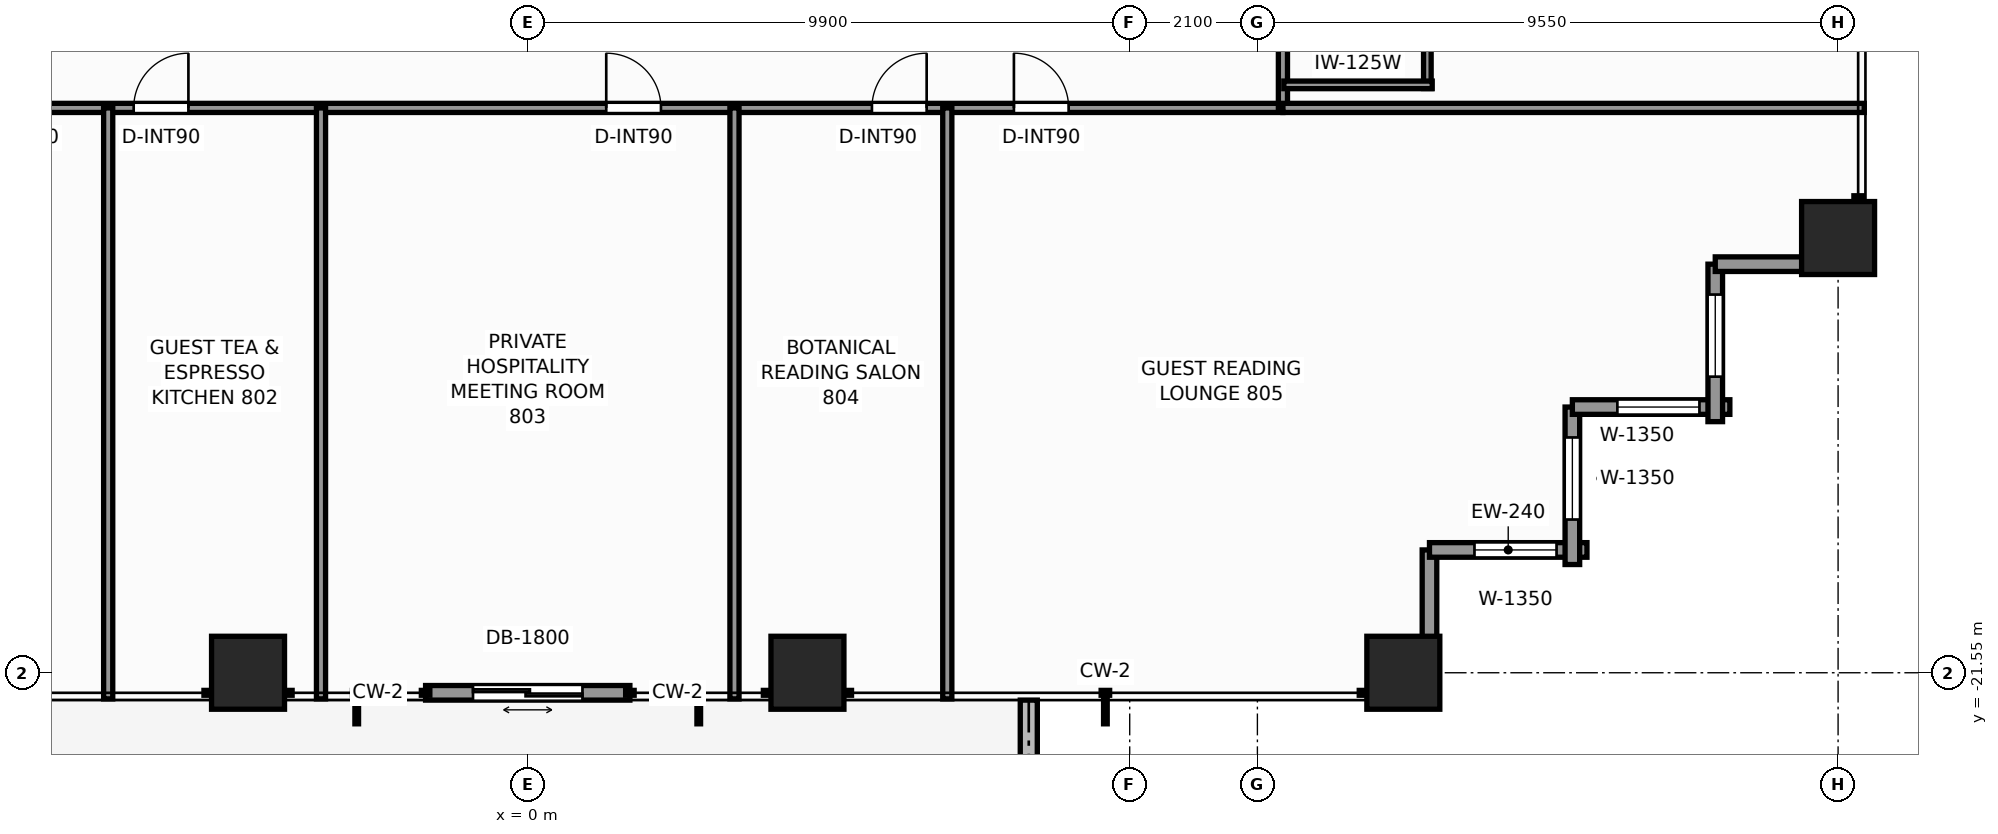
"""IFC4 building model, lengths in metres.
Left out: names, types, materials, properties, quantities, classifications, styles, units other than length and angle.
Written with IfcOpenShell. Run it as: python <this file> out.ifc"""

import sys

from ifc_helpers import new_model, si_unit, direction, frame, frame_2d, origin, origin_2d, place, context, subcontext, project, spatial, rectangle, extrude, element, fill, save


model = new_model("IFC4")
c1 = context("Model", 3, precision=1e-05, world=origin(), true_north=direction((0.0, 1.0)))
c2 = subcontext(c1, "Body", "Model", "MODEL_VIEW")
j1 = project(units=[si_unit("LENGTHUNIT", "METRE"), si_unit("PLANEANGLEUNIT", "RADIAN")], contexts=[c1])
p1 = place(None, origin())
s1 = spatial("IfcSite", under=j1, at=p1, CompositionType="ELEMENT")
p2 = place(p1, origin())
s2 = spatial("IfcBuilding", under=s1, at=p2, CompositionType="ELEMENT")
p3 = place(p2, frame((0.0, 0.0, 30.4)))
s3 = spatial("IfcBuildingStorey", under=s2, at=p3, CompositionType="ELEMENT", Elevation=30.4)
for number, where, z_axis, x_axis in (
    (1, (-4.6, -21.55, 0.0), (0.0, 0.0, 1.0), (1.0, 0.0, 0.0)),
    (2, (4.6, -21.55, 0.0), (0.0, 0.0, 1.0), (1.0, 0.0, 0.0)),
    (3, (14.4, -21.55, 0.0), (0.0, 0.0, 1.0), (1.0, 0.0, 0.0)),
    (4, (21.55, -14.4, 0.0), (0.0, 0.0, 1.0), (1.0, 0.0, 0.0)),
):
    element("IfcColumn", number, at=place(p3, frame(where, z_axis=z_axis, x_axis=x_axis)), inside=s3, PredefinedType="COLUMN", context=c2, shape_type="SweptSolid", body=[
        extrude(rectangle(XDim=1.2, YDim=1.2, at=origin_2d()), origin(), (0.0, 0.0, 1.0), 3.3),
    ])
p4 = place(p3, frame((8.24, -25.42, -0.06), z_axis=(0.0, 0.0, 1.0), x_axis=(0.0, 1.0, 0.0)))
e5 = element("IfcWall", 5, at=p4, inside=s3, PredefinedType="PARAPET", context=c2, shape_type="SweptSolid", body=[
    extrude(rectangle(XDim=3.42, YDim=0.28, at=frame_2d((1.71, 0.0))), origin(), (0.0, 0.0, 1.0), 0.42),
])
p5 = place(p3, frame((1.68, -21.88, 0.0), z_axis=(0.0, 0.0, 1.0), x_axis=(-1.0, 0.0, 0.0)))
e6 = element("IfcWall", 6, at=p5, inside=s3, PredefinedType="STANDARD", context=c2, shape_type="SweptSolid", body=[
    extrude(rectangle(XDim=3.36, YDim=0.24, at=frame_2d((1.68, 0.0))), origin(), (0.0, 0.0, 1.0), 3.06),
])
p6 = place(p5, frame((0.78, 0.0, 0.0)))
e7 = element("IfcOpeningElement", 7, at=p6, cuts=e6, PredefinedType="OPENING", context=c2, shape_type="SweptSolid", body=[
    extrude(rectangle(XDim=1.8, YDim=2.2, at=frame_2d((0.9, 1.1))), frame((0.0, 0.13, 0.0), z_axis=(0.0, -1.0, 0.0), x_axis=(1.0, 0.0, 0.0)), (0.0, 0.0, 1.0), 0.26),
])
p7 = place(p3, frame((14.83, -19.53, 0.0), z_axis=(0.0, 0.0, 1.0), x_axis=(0.0, -1.0, 0.0)))
e8 = element("IfcWall", 8, at=p7, inside=s3, PredefinedType="STANDARD", context=c2, shape_type="SweptSolid", body=[
    extrude(rectangle(XDim=2.59, YDim=0.24, at=frame_2d((1.295, 0.0))), origin(), (0.0, 0.0, 1.0), 2.439),
])
p8 = place(p3, frame((17.42, -19.53, 0.0), z_axis=(0.0, 0.0, 1.0), x_axis=(-1.0, 0.0, 0.0)))
e9 = element("IfcWall", 9, at=p8, inside=s3, PredefinedType="STANDARD", context=c2, shape_type="SweptSolid", body=[
    extrude(rectangle(XDim=2.59, YDim=0.24, at=frame_2d((1.295, 0.0))), origin(), (0.0, 0.0, 1.0), 2.439),
])
p9 = place(p8, frame((0.5, 0.0, 0.65)))
e10 = element("IfcOpeningElement", 10, at=p9, cuts=e9, PredefinedType="OPENING", context=c2, shape_type="SweptSolid", body=[
    extrude(rectangle(XDim=1.35, YDim=1.55, at=frame_2d((0.675, 0.775))), frame((0.0, 0.13, 0.0), z_axis=(0.0, -1.0, 0.0), x_axis=(1.0, 0.0, 0.0)), (0.0, 0.0, 1.0), 0.26),
])
p10 = place(p3, frame((17.18, -17.18, 0.0), z_axis=(0.0, 0.0, 1.0), x_axis=(0.0, -1.0, 0.0)))
e11 = element("IfcWall", 11, at=p10, inside=s3, PredefinedType="STANDARD", context=c2, shape_type="SweptSolid", body=[
    extrude(rectangle(XDim=2.59, YDim=0.24, at=frame_2d((1.295, 0.0))), origin(), (0.0, 0.0, 1.0), 2.439),
])
p11 = place(p10, frame((0.5, 0.0, 0.65)))
e12 = element("IfcOpeningElement", 12, at=p11, cuts=e11, PredefinedType="OPENING", context=c2, shape_type="SweptSolid", body=[
    extrude(rectangle(XDim=1.35, YDim=1.55, at=frame_2d((0.675, 0.775))), frame((0.0, 0.13, 0.0), z_axis=(0.0, -1.0, 0.0), x_axis=(1.0, 0.0, 0.0)), (0.0, 0.0, 1.0), 0.26),
])
p12 = place(p3, frame((19.77, -17.18, 0.0), z_axis=(0.0, 0.0, 1.0), x_axis=(-1.0, 0.0, 0.0)))
e13 = element("IfcWall", 13, at=p12, inside=s3, PredefinedType="STANDARD", context=c2, shape_type="SweptSolid", body=[
    extrude(rectangle(XDim=2.59, YDim=0.24, at=frame_2d((1.295, 0.0))), origin(), (0.0, 0.0, 1.0), 2.439),
])
p13 = place(p12, frame((0.5, 0.0, 0.65)))
e14 = element("IfcOpeningElement", 14, at=p13, cuts=e13, PredefinedType="OPENING", context=c2, shape_type="SweptSolid", body=[
    extrude(rectangle(XDim=1.35, YDim=1.55, at=frame_2d((0.675, 0.775))), frame((0.0, 0.13, 0.0), z_axis=(0.0, -1.0, 0.0), x_axis=(1.0, 0.0, 0.0)), (0.0, 0.0, 1.0), 0.26),
])
p14 = place(p3, frame((19.53, -14.83, 0.0), z_axis=(0.0, 0.0, 1.0), x_axis=(0.0, -1.0, 0.0)))
e15 = element("IfcWall", 15, at=p14, inside=s3, PredefinedType="STANDARD", context=c2, shape_type="SweptSolid", body=[
    extrude(rectangle(XDim=2.59, YDim=0.24, at=frame_2d((1.295, 0.0))), origin(), (0.0, 0.0, 1.0), 2.439),
])
p15 = place(p14, frame((0.5, 0.0, 0.65)))
e16 = element("IfcOpeningElement", 16, at=p15, cuts=e15, PredefinedType="OPENING", context=c2, shape_type="SweptSolid", body=[
    extrude(rectangle(XDim=1.35, YDim=1.55, at=frame_2d((0.675, 0.775))), frame((0.0, 0.13, 0.0), z_axis=(0.0, -1.0, 0.0), x_axis=(1.0, 0.0, 0.0)), (0.0, 0.0, 1.0), 0.26),
])
p16 = place(p3, frame((22.12, -14.83, 0.0), z_axis=(0.0, 0.0, 1.0), x_axis=(-1.0, 0.0, 0.0)))
e17 = element("IfcWall", 17, at=p16, inside=s3, PredefinedType="STANDARD", context=c2, shape_type="SweptSolid", body=[
    extrude(rectangle(XDim=2.59, YDim=0.24, at=frame_2d((1.295, 0.0))), origin(), (0.0, 0.0, 1.0), 2.439),
])
p17 = place(p3, frame((-12.26, -12.26, 0.0), z_axis=(0.0, 0.0, 1.0), x_axis=(1.0, 0.0, 0.0)))
e18 = element("IfcWall", 18, at=p17, inside=s3, PredefinedType="PARTITIONING", context=c2, shape_type="SweptSolid", body=[
    extrude(rectangle(XDim=24.68, YDim=0.15, at=frame_2d((12.34, 0.0))), origin(), (0.0, 0.0, 1.0), 2.272),
])
p18 = place(p17, frame((3.444, 0.0, 0.0)))
e19 = element("IfcOpeningElement", 19, at=p18, cuts=e18, PredefinedType="OPENING", context=c2, shape_type="SweptSolid", body=[
    extrude(rectangle(XDim=0.9, YDim=2.06, at=frame_2d((0.45, 1.03))), frame((0.0, 0.085, 0.0), z_axis=(0.0, -1.0, 0.0), x_axis=(1.0, 0.0, 0.0)), (0.0, 0.0, 1.0), 0.17),
])
p19 = place(p17, frame((5.779, 0.0, 0.0)))
e20 = element("IfcOpeningElement", 20, at=p19, cuts=e18, PredefinedType="OPENING", context=c2, shape_type="SweptSolid", body=[
    extrude(rectangle(XDim=0.9, YDim=2.06, at=frame_2d((0.45, 1.03))), frame((0.0, 0.085, 0.0), z_axis=(0.0, -1.0, 0.0), x_axis=(1.0, 0.0, 0.0)), (0.0, 0.0, 1.0), 0.17),
])
p20 = place(p17, frame((13.551, 0.0, 0.0)))
e21 = element("IfcOpeningElement", 21, at=p20, cuts=e18, PredefinedType="OPENING", context=c2, shape_type="SweptSolid", body=[
    extrude(rectangle(XDim=0.9, YDim=2.06, at=frame_2d((0.45, 1.03))), frame((0.0, 0.085, 0.0), z_axis=(0.0, -1.0, 0.0), x_axis=(1.0, 0.0, 0.0)), (0.0, 0.0, 1.0), 0.17),
])
p21 = place(p17, frame((17.921, 0.0, 0.0)))
e22 = element("IfcOpeningElement", 22, at=p21, cuts=e18, PredefinedType="OPENING", context=c2, shape_type="SweptSolid", body=[
    extrude(rectangle(XDim=0.9, YDim=2.06, at=frame_2d((0.45, 1.03))), frame((0.0, 0.085, 0.0), z_axis=(0.0, -1.0, 0.0), x_axis=(1.0, 0.0, 0.0)), (0.0, 0.0, 1.0), 0.17),
])
p22 = place(p17, frame((20.256, 0.0, 0.0)))
e23 = element("IfcOpeningElement", 23, at=p22, cuts=e18, PredefinedType="OPENING", context=c2, shape_type="SweptSolid", body=[
    extrude(rectangle(XDim=0.9, YDim=2.06, at=frame_2d((0.45, 1.03))), frame((0.0, 0.085, 0.0), z_axis=(0.0, -1.0, 0.0), x_axis=(1.0, 0.0, 0.0)), (0.0, 0.0, 1.0), 0.17),
])
p23 = place(p3, frame((12.42, -12.26, 0.0), z_axis=(0.0, 0.0, 1.0), x_axis=(0.0, 1.0, 0.0)))
e24 = element("IfcWall", 24, at=p23, inside=s3, PredefinedType="PARTITIONING", context=c2, shape_type="SweptSolid", body=[
    extrude(rectangle(XDim=24.84, YDim=0.15, at=frame_2d((12.42, 0.0))), origin(), (0.0, 0.0, 1.0), 2.272),
])
p24 = place(p23, frame((4.099, 0.0, 0.0)))
e25 = element("IfcOpeningElement", 25, at=p24, cuts=e24, PredefinedType="OPENING", context=c2, shape_type="SweptSolid", body=[
    extrude(rectangle(XDim=0.95, YDim=2.06, at=frame_2d((0.475, 1.03))), frame((0.0, 0.085, 0.0), z_axis=(0.0, -1.0, 0.0), x_axis=(1.0, 0.0, 0.0)), (0.0, 0.0, 1.0), 0.17),
])
p25 = place(p23, frame((13.577, 0.0, 0.0)))
e26 = element("IfcOpeningElement", 26, at=p25, cuts=e24, PredefinedType="OPENING", context=c2, shape_type="SweptSolid", body=[
    extrude(rectangle(XDim=0.95, YDim=2.06, at=frame_2d((0.475, 1.03))), frame((0.0, 0.085, 0.0), z_axis=(0.0, -1.0, 0.0), x_axis=(1.0, 0.0, 0.0)), (0.0, 0.0, 1.0), 0.17),
])
p26 = place(p23, frame((19.692, 0.0, 0.0)))
e27 = element("IfcOpeningElement", 27, at=p26, cuts=e24, PredefinedType="OPENING", context=c2, shape_type="SweptSolid", body=[
    extrude(rectangle(XDim=0.95, YDim=2.06, at=frame_2d((0.475, 1.03))), frame((0.0, 0.085, 0.0), z_axis=(0.0, -1.0, 0.0), x_axis=(1.0, 0.0, 0.0)), (0.0, 0.0, 1.0), 0.17),
])
p27 = place(p3, frame((12.42, -12.26, 0.0), z_axis=(0.0, 0.0, 1.0), x_axis=(1.0, 0.0, 0.0)))
e28 = element("IfcWall", 28, at=p27, inside=s3, PredefinedType="PARTITIONING", context=c2, shape_type="SweptSolid", body=[
    extrude(rectangle(XDim=9.56, YDim=0.15, at=frame_2d((4.78, 0.0))), origin(), (0.0, 0.0, 1.0), 2.272),
])
for number, where, z_axis, x_axis in (
    (29, (-6.9, -21.98, 0.0), (0.0, 0.0, 1.0), (0.0, 1.0, 0.0)),
    (30, (-3.4, -21.98, 0.0), (0.0, 0.0, 1.0), (0.0, 1.0, 0.0)),
    (31, (3.4, -21.98, 0.0), (0.0, 0.0, 1.0), (0.0, 1.0, 0.0)),
    (32, (6.9, -21.98, 0.0), (0.0, 0.0, 1.0), (0.0, 1.0, 0.0)),
):
    element("IfcWall", number, at=place(p3, frame(where, z_axis=z_axis, x_axis=x_axis)), inside=s3, PredefinedType="PARTITIONING", context=c2, shape_type="SweptSolid", body=[
        extrude(rectangle(XDim=9.72, YDim=0.15, at=frame_2d((4.86, 0.0))), origin(), (0.0, 0.0, 1.0), 2.429),
    ])
p28 = place(p3, frame((14.795, -11.941, 0.0), z_axis=(0.0, 0.0, 1.0), x_axis=(0.0, 1.0, 0.0)))
e33 = element("IfcWall", 33, at=p28, inside=s3, PredefinedType="PARTITIONING", context=c2, shape_type="SweptSolid", body=[
    extrude(rectangle(XDim=2.27, YDim=0.125, at=frame_2d((1.135, 0.0))), origin(), (0.0, 0.0, 1.0), 2.272),
])
p29 = place(p3, frame((12.435, -11.881, 0.0), z_axis=(0.0, 0.0, 1.0), x_axis=(1.0, 0.0, 0.0)))
e34 = element("IfcWall", 34, at=p29, inside=s3, PredefinedType="PARTITIONING", context=c2, shape_type="SweptSolid", body=[
    extrude(rectangle(XDim=2.44, YDim=0.125, at=frame_2d((1.22, 0.0))), origin(), (0.0, 0.0, 1.0), 2.272),
])
p30 = place(p6, origin())
e35 = element("IfcDoor", 35, at=p30, inside=s3, OperationType="DOUBLE_DOOR_SLIDING", PredefinedType="DOOR", context=c2, shape_type="SweptSolid", body=[
    extrude(rectangle(XDim=1.8, YDim=2.2, at=frame_2d((0.9, 1.1))), frame((0.0, 0.025, 0.0), z_axis=(0.0, -1.0, 0.0), x_axis=(1.0, 0.0, 0.0)), (0.0, 0.0, 1.0), 0.05),
])
fill(e7, e35)
p31 = place(p9, origin())
e36 = element("IfcWindow", 36, at=p31, inside=s3, PartitioningType="SINGLE_PANEL", PredefinedType="WINDOW", context=c2, shape_type="SweptSolid", body=[
    extrude(rectangle(XDim=1.35, YDim=1.55, at=frame_2d((0.675, 0.775))), frame((0.0, 0.03, 0.0), z_axis=(0.0, -1.0, 0.0), x_axis=(1.0, 0.0, 0.0)), (0.0, 0.0, 1.0), 0.06),
])
fill(e10, e36)
p32 = place(p11, origin())
e37 = element("IfcWindow", 37, at=p32, inside=s3, PartitioningType="SINGLE_PANEL", PredefinedType="WINDOW", context=c2, shape_type="SweptSolid", body=[
    extrude(rectangle(XDim=1.35, YDim=1.55, at=frame_2d((0.675, 0.775))), frame((0.0, 0.03, 0.0), z_axis=(0.0, -1.0, 0.0), x_axis=(1.0, 0.0, 0.0)), (0.0, 0.0, 1.0), 0.06),
])
fill(e12, e37)
p33 = place(p13, origin())
e38 = element("IfcWindow", 38, at=p33, inside=s3, PartitioningType="SINGLE_PANEL", PredefinedType="WINDOW", context=c2, shape_type="SweptSolid", body=[
    extrude(rectangle(XDim=1.35, YDim=1.55, at=frame_2d((0.675, 0.775))), frame((0.0, 0.03, 0.0), z_axis=(0.0, -1.0, 0.0), x_axis=(1.0, 0.0, 0.0)), (0.0, 0.0, 1.0), 0.06),
])
fill(e14, e38)
p34 = place(p15, origin())
e39 = element("IfcWindow", 39, at=p34, inside=s3, PartitioningType="SINGLE_PANEL", PredefinedType="WINDOW", context=c2, shape_type="SweptSolid", body=[
    extrude(rectangle(XDim=1.35, YDim=1.55, at=frame_2d((0.675, 0.775))), frame((0.0, 0.03, 0.0), z_axis=(0.0, -1.0, 0.0), x_axis=(1.0, 0.0, 0.0)), (0.0, 0.0, 1.0), 0.06),
])
fill(e16, e39)
p35 = place(p19, origin())
e40 = element("IfcDoor", 40, at=p35, inside=s3, OperationType="SINGLE_SWING_RIGHT", PredefinedType="DOOR", context=c2, shape_type="SweptSolid", body=[
    extrude(rectangle(XDim=0.9, YDim=2.06, at=frame_2d((0.45, 1.03))), frame((0.0, 0.025, 0.0), z_axis=(0.0, -1.0, 0.0), x_axis=(1.0, 0.0, 0.0)), (0.0, 0.0, 1.0), 0.05),
])
fill(e20, e40)
p36 = place(p20, origin())
e41 = element("IfcDoor", 41, at=p36, inside=s3, OperationType="SINGLE_SWING_LEFT", PredefinedType="DOOR", context=c2, shape_type="SweptSolid", body=[
    extrude(rectangle(XDim=0.9, YDim=2.06, at=frame_2d((0.45, 1.03))), frame((0.0, 0.025, 0.0), z_axis=(0.0, -1.0, 0.0), x_axis=(1.0, 0.0, 0.0)), (0.0, 0.0, 1.0), 0.05),
])
fill(e21, e41)
p37 = place(p21, origin())
e42 = element("IfcDoor", 42, at=p37, inside=s3, OperationType="SINGLE_SWING_RIGHT", PredefinedType="DOOR", context=c2, shape_type="SweptSolid", body=[
    extrude(rectangle(XDim=0.9, YDim=2.06, at=frame_2d((0.45, 1.03))), frame((0.0, 0.025, 0.0), z_axis=(0.0, -1.0, 0.0), x_axis=(1.0, 0.0, 0.0)), (0.0, 0.0, 1.0), 0.05),
])
fill(e22, e42)
p38 = place(p22, origin())
e43 = element("IfcDoor", 43, at=p38, inside=s3, OperationType="SINGLE_SWING_LEFT", PredefinedType="DOOR", context=c2, shape_type="SweptSolid", body=[
    extrude(rectangle(XDim=0.9, YDim=2.06, at=frame_2d((0.45, 1.03))), frame((0.0, 0.025, 0.0), z_axis=(0.0, -1.0, 0.0), x_axis=(1.0, 0.0, 0.0)), (0.0, 0.0, 1.0), 0.05),
])
fill(e23, e43)
save(model, sys.argv[1])
